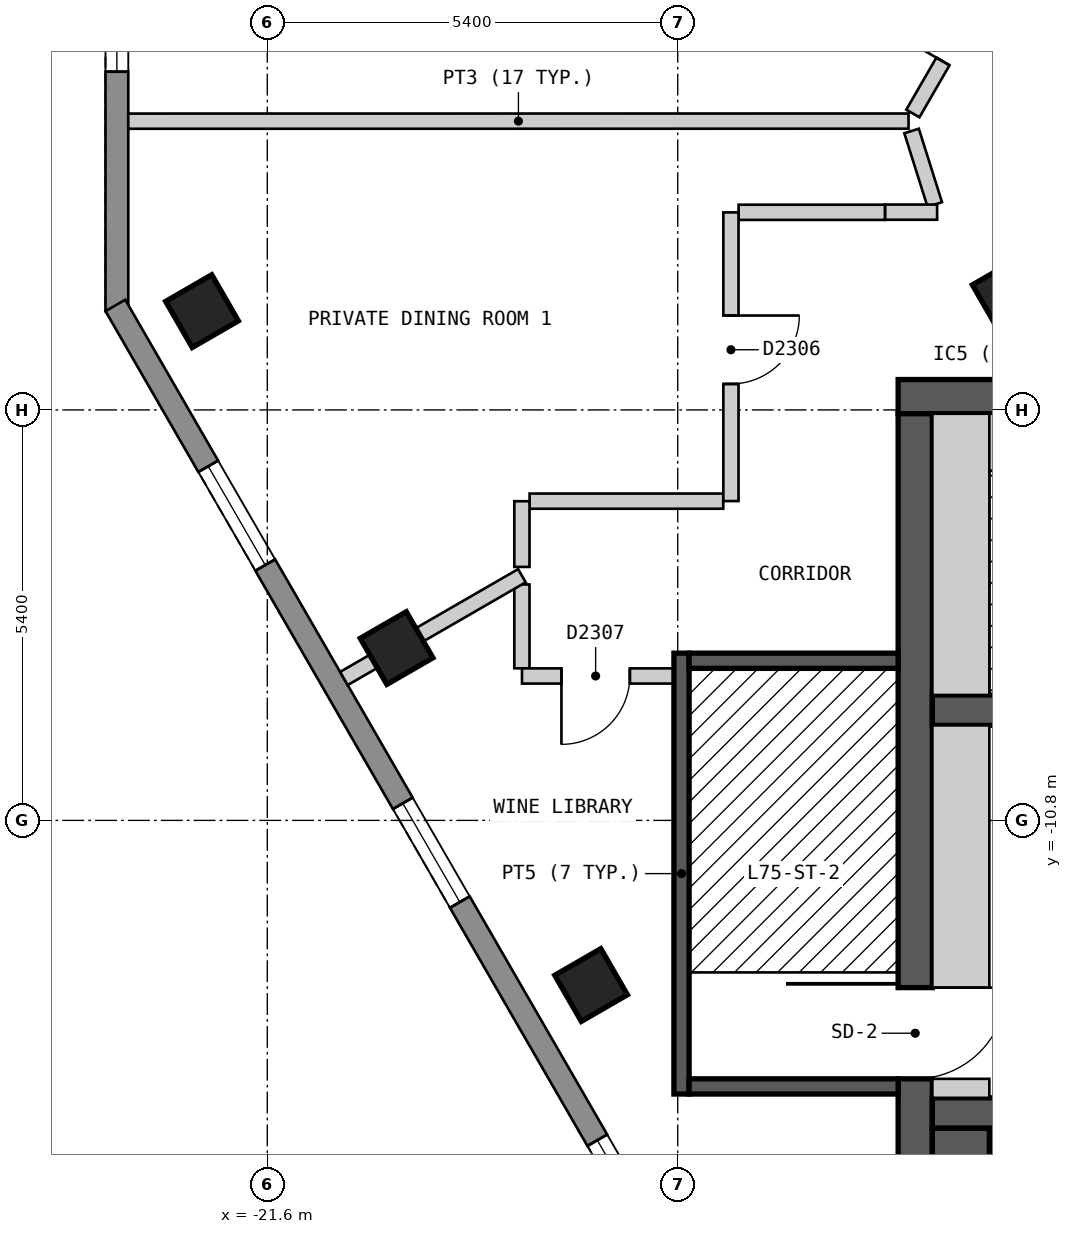
"""IFC4 building model, lengths in metres.
Left out: names, types, materials, properties, quantities, classifications, styles, units other than length and angle.
Written with IfcOpenShell. Run it as: python <this file> out.ifc"""

import sys

from ifc_helpers import new_model, si_unit, direction, frame, frame_2d, origin, origin_2d, place, context, subcontext, project, spatial, polyline, rectangle, outline, extrude, element, fill, save


model = new_model("IFC4")
c1 = context("Model", 3, precision=1e-05, world=origin(), true_north=direction((0.0, 1.0)))
c2 = subcontext(c1, "Body", "Model", "MODEL_VIEW")
j1 = project(units=[si_unit("LENGTHUNIT", "METRE"), si_unit("PLANEANGLEUNIT", "RADIAN")], contexts=[c1])
p1 = place(None, origin())
s1 = spatial("IfcSite", under=j1, at=p1, CompositionType="ELEMENT")
p2 = place(p1, origin())
s2 = spatial("IfcBuilding", under=s1, at=p2, CompositionType="ELEMENT")
p3 = place(p2, frame((0.0, 0.0, 241.8)))
s3 = spatial("IfcBuildingStorey", under=s2, at=p3, CompositionType="ELEMENT", Elevation=241.8)
for number, where, z_axis, x_axis in (
    (1, (-22.459, -4.1, 0.0), (0.0, 0.0, 1.0), (0.5, -0.866, 0.0)),
    (2, (-19.899, -8.533, 0.0), (0.0, 0.0, 1.0), (0.5, -0.866, 0.0)),
    (3, (-17.34, -12.966, 0.0), (0.0, 0.0, 1.0), (0.5, -0.866, 0.0)),
    (4, (-11.845, -3.883, 0.0), (0.0, 0.0, 1.0), (0.5, -0.866, 0.0)),
):
    element("IfcColumn", number, at=place(p3, frame(where, z_axis=z_axis, x_axis=x_axis)), inside=s3, PredefinedType="COLUMN", context=c2, shape_type="SweptSolid", body=[
        extrude(rectangle(XDim=0.7, YDim=0.7, at=origin_2d()), origin(), (0.0, 0.0, 1.0), 3.0),
    ])
p4 = place(p3, frame((-13.3, -5.225, 0.0), z_axis=(0.0, 0.0, 1.0), x_axis=(1.0, 0.0, 0.0)))
e5 = element("IfcWall", 5, at=p4, inside=s3, PredefinedType="SHEAR", context=c2, shape_type="SweptSolid", body=[
    extrude(rectangle(XDim=26.6, YDim=0.45, at=frame_2d((13.3, 0.0))), origin(), (0.0, 0.0, 1.0), 2.2),
])
p5 = place(p4, frame((23.65, 0.0, 0.0)))
e6 = element("IfcOpeningElement", 6, at=p5, cuts=e5, PredefinedType="OPENING", context=c2, shape_type="SweptSolid", body=[
    extrude(rectangle(XDim=1.2, YDim=2.1, at=frame_2d((0.6, 1.05))), frame((0.0, 0.235, 0.0), z_axis=(0.0, -1.0, 0.0), x_axis=(1.0, 0.0, 0.0)), (0.0, 0.0, 1.0), 0.47),
])
p6 = place(p3, frame((-13.075, -18.55, 0.0), z_axis=(0.0, 0.0, 1.0), x_axis=(0.0, 1.0, 0.0)))
e7 = element("IfcWall", 7, at=p6, inside=s3, PredefinedType="SHEAR", context=c2, shape_type="SweptSolid", body=[
    extrude(rectangle(XDim=13.1, YDim=0.45, at=frame_2d((6.55, 0.0))), origin(), (0.0, 0.0, 1.0), 2.2),
])
p7 = place(p6, frame((4.35, 0.0, 0.0)))
e8 = element("IfcOpeningElement", 8, at=p7, cuts=e7, PredefinedType="OPENING", context=c2, shape_type="SweptSolid", body=[
    extrude(rectangle(XDim=1.2, YDim=2.1, at=frame_2d((0.6, 1.05))), frame((0.0, 0.235, 0.0), z_axis=(0.0, -1.0, 0.0), x_axis=(1.0, 0.0, 0.0)), (0.0, 0.0, 1.0), 0.47),
])
p8 = place(p3, frame((-12.85, -14.65, 0.0), z_axis=(0.0, 0.0, 1.0), x_axis=(1.0, 0.0, 0.0)))
e9 = element("IfcWall", 9, at=p8, inside=s3, PredefinedType="SHEAR", context=c2, shape_type="SweptSolid", body=[
    extrude(rectangle(XDim=25.7, YDim=0.4, at=frame_2d((12.85, 0.0))), origin(), (0.0, 0.0, 1.0), 2.2),
])
p9 = place(p8, frame((2.05, 0.0, 0.0), z_axis=(0.0, 0.0, 1.0), x_axis=(-1.0, 0.0, 0.0)))
e10 = element("IfcOpeningElement", 10, at=p9, cuts=e9, PredefinedType="OPENING", context=c2, shape_type="SweptSolid", body=[
    extrude(rectangle(XDim=1.2, YDim=2.1, at=frame_2d((0.6, 1.05))), frame((0.0, 0.21, 0.0), z_axis=(0.0, -1.0, 0.0), x_axis=(1.0, 0.0, 0.0)), (0.0, 0.0, 1.0), 0.42),
])
p10 = place(p8, frame((24.9, 0.0, 0.0), z_axis=(0.0, 0.0, 1.0), x_axis=(-1.0, 0.0, 0.0)))
e11 = element("IfcOpeningElement", 11, at=p10, cuts=e9, PredefinedType="OPENING", context=c2, shape_type="SweptSolid", body=[
    extrude(rectangle(XDim=1.2, YDim=2.1, at=frame_2d((0.6, 1.05))), frame((0.0, 0.21, 0.0), z_axis=(0.0, -1.0, 0.0), x_axis=(1.0, 0.0, 0.0)), (0.0, 0.0, 1.0), 0.42),
])
p11 = place(p8, frame((10.0, 0.0, 0.0), z_axis=(0.0, 0.0, 1.0), x_axis=(-1.0, 0.0, 0.0)))
e12 = element("IfcOpeningElement", 12, at=p11, cuts=e9, PredefinedType="OPENING", context=c2, shape_type="SweptSolid", body=[
    extrude(rectangle(XDim=1.0, YDim=2.1, at=frame_2d((0.5, 1.05))), frame((0.0, 0.21, 0.0), z_axis=(0.0, -1.0, 0.0), x_axis=(1.0, 0.0, 0.0)), (0.0, 0.0, 1.0), 0.42),
])
p12 = place(p8, frame((16.4, 0.0, 0.0), z_axis=(0.0, 0.0, 1.0), x_axis=(-1.0, 0.0, 0.0)))
e13 = element("IfcOpeningElement", 13, at=p12, cuts=e9, PredefinedType="OPENING", context=c2, shape_type="SweptSolid", body=[
    extrude(rectangle(XDim=1.0, YDim=2.1, at=frame_2d((0.5, 1.05))), frame((0.0, 0.21, 0.0), z_axis=(0.0, -1.0, 0.0), x_axis=(1.0, 0.0, 0.0)), (0.0, 0.0, 1.0), 0.42),
])
p13 = place(p3, frame((-12.85, -9.35, 0.0), z_axis=(0.0, 0.0, 1.0), x_axis=(1.0, 0.0, 0.0)))
e14 = element("IfcWall", 14, at=p13, inside=s3, PredefinedType="SHEAR", context=c2, shape_type="SweptSolid", body=[
    extrude(rectangle(XDim=23.05, YDim=0.4, at=frame_2d((11.525, 0.0))), origin(), (0.0, 0.0, 1.0), 2.2),
])
p14 = place(p13, frame((1.45, 0.0, 0.0)))
e15 = element("IfcOpeningElement", 15, at=p14, cuts=e14, PredefinedType="OPENING", context=c2, shape_type="SweptSolid", body=[
    extrude(rectangle(XDim=1.1, YDim=2.1, at=frame_2d((0.55, 1.05))), frame((0.0, 0.21, 0.0), z_axis=(0.0, -1.0, 0.0), x_axis=(1.0, 0.0, 0.0)), (0.0, 0.0, 1.0), 0.42),
])
p15 = place(p13, frame((4.25, 0.0, 0.0)))
e16 = element("IfcOpeningElement", 16, at=p15, cuts=e14, PredefinedType="OPENING", context=c2, shape_type="SweptSolid", body=[
    extrude(rectangle(XDim=1.1, YDim=2.1, at=frame_2d((0.55, 1.05))), frame((0.0, 0.21, 0.0), z_axis=(0.0, -1.0, 0.0), x_axis=(1.0, 0.0, 0.0)), (0.0, 0.0, 1.0), 0.42),
])
p16 = place(p13, frame((7.05, 0.0, 0.0)))
e17 = element("IfcOpeningElement", 17, at=p16, cuts=e14, PredefinedType="OPENING", context=c2, shape_type="SweptSolid", body=[
    extrude(rectangle(XDim=1.1, YDim=2.1, at=frame_2d((0.55, 1.05))), frame((0.0, 0.21, 0.0), z_axis=(0.0, -1.0, 0.0), x_axis=(1.0, 0.0, 0.0)), (0.0, 0.0, 1.0), 0.42),
])
p17 = place(p13, frame((9.35, 0.0, 0.0)))
e18 = element("IfcOpeningElement", 18, at=p17, cuts=e14, PredefinedType="OPENING", context=c2, shape_type="SweptSolid", body=[
    extrude(rectangle(XDim=1.1, YDim=2.1, at=frame_2d((0.55, 1.05))), frame((0.0, 0.21, 0.0), z_axis=(0.0, -1.0, 0.0), x_axis=(1.0, 0.0, 0.0)), (0.0, 0.0, 1.0), 0.42),
])
p18 = place(p13, frame((11.65, 0.0, 0.0)))
e19 = element("IfcOpeningElement", 19, at=p18, cuts=e14, PredefinedType="OPENING", context=c2, shape_type="SweptSolid", body=[
    extrude(rectangle(XDim=1.1, YDim=2.1, at=frame_2d((0.55, 1.05))), frame((0.0, 0.21, 0.0), z_axis=(0.0, -1.0, 0.0), x_axis=(1.0, 0.0, 0.0)), (0.0, 0.0, 1.0), 0.42),
])
p19 = place(p13, frame((13.95, 0.0, 0.0)))
e20 = element("IfcOpeningElement", 20, at=p19, cuts=e14, PredefinedType="OPENING", context=c2, shape_type="SweptSolid", body=[
    extrude(rectangle(XDim=1.1, YDim=2.1, at=frame_2d((0.55, 1.05))), frame((0.0, 0.21, 0.0), z_axis=(0.0, -1.0, 0.0), x_axis=(1.0, 0.0, 0.0)), (0.0, 0.0, 1.0), 0.42),
])
p20 = place(p13, frame((16.25, 0.0, 0.0)))
e21 = element("IfcOpeningElement", 21, at=p20, cuts=e14, PredefinedType="OPENING", context=c2, shape_type="SweptSolid", body=[
    extrude(rectangle(XDim=1.1, YDim=2.1, at=frame_2d((0.55, 1.05))), frame((0.0, 0.21, 0.0), z_axis=(0.0, -1.0, 0.0), x_axis=(1.0, 0.0, 0.0)), (0.0, 0.0, 1.0), 0.42),
])
p21 = place(p13, frame((18.55, 0.0, 0.0)))
e22 = element("IfcOpeningElement", 22, at=p21, cuts=e14, PredefinedType="OPENING", context=c2, shape_type="SweptSolid", body=[
    extrude(rectangle(XDim=1.1, YDim=2.1, at=frame_2d((0.55, 1.05))), frame((0.0, 0.21, 0.0), z_axis=(0.0, -1.0, 0.0), x_axis=(1.0, 0.0, 0.0)), (0.0, 0.0, 1.0), 0.42),
])
p22 = place(p13, frame((20.95, 0.0, 0.0)))
e23 = element("IfcOpeningElement", 23, at=p22, cuts=e14, PredefinedType="OPENING", context=c2, shape_type="SweptSolid", body=[
    extrude(rectangle(XDim=1.1, YDim=2.1, at=frame_2d((0.55, 1.05))), frame((0.0, 0.21, 0.0), z_axis=(0.0, -1.0, 0.0), x_axis=(1.0, 0.0, 0.0)), (0.0, 0.0, 1.0), 0.42),
])
p23 = place(p3, frame((-23.579, 0.9, 0.0), z_axis=(0.0, 0.0, 1.0), x_axis=(0.0, -1.0, 0.0)))
e24 = element("IfcWall", 24, at=p23, inside=s3, PredefinedType="SOLIDWALL", context=c2, shape_type="SweptSolid", body=[
    extrude(outline(polyline([(0.0, -0.15), (5.0, -0.15), (4.92, 0.15), (0.08, 0.15), (0.0, -0.15)])), origin(), (0.0, 0.0, 1.0), 2.2),
])
p24 = place(p23, frame((0.65, 0.0, 0.15)))
e25 = element("IfcOpeningElement", 25, at=p24, cuts=e24, PredefinedType="OPENING", context=c2, shape_type="SweptSolid", body=[
    extrude(rectangle(XDim=1.2, YDim=2.1, at=frame_2d((0.6, 1.05))), frame((0.0, 0.16, 0.0), z_axis=(0.0, -1.0, 0.0), x_axis=(1.0, 0.0, 0.0)), (0.0, 0.0, 1.0), 0.32),
])
p25 = place(p3, frame((-23.599, -4.025, 0.0), z_axis=(0.0, 0.0, 1.0), x_axis=(0.500012653391, -0.866018098222, 0.0)))
e26 = element("IfcWall", 26, at=p25, inside=s3, PredefinedType="SOLIDWALL", context=c2, shape_type="SweptSolid", body=[
    extrude(outline(polyline([(0.0, -0.15), (16.628, -0.15), (16.548, 0.15), (0.08, 0.15), (0.0, -0.15)])), origin(), (0.0, 0.0, 1.0), 2.2),
])
p26 = place(p25, frame((2.444, 0.0, 0.15)))
e27 = element("IfcOpeningElement", 27, at=p26, cuts=e26, PredefinedType="OPENING", context=c2, shape_type="SweptSolid", body=[
    extrude(rectangle(XDim=1.5, YDim=2.1, at=frame_2d((0.75, 1.05))), frame((0.0, 0.16, 0.0), z_axis=(0.0, -1.0, 0.0), x_axis=(1.0, 0.0, 0.0)), (0.0, 0.0, 1.0), 0.32),
])
p27 = place(p25, frame((7.564, 0.0, 0.15)))
e28 = element("IfcOpeningElement", 28, at=p27, cuts=e26, PredefinedType="OPENING", context=c2, shape_type="SweptSolid", body=[
    extrude(rectangle(XDim=1.5, YDim=2.1, at=frame_2d((0.75, 1.05))), frame((0.0, 0.16, 0.0), z_axis=(0.0, -1.0, 0.0), x_axis=(1.0, 0.0, 0.0)), (0.0, 0.0, 1.0), 0.32),
])
p28 = place(p25, frame((12.682, 0.0, 0.15)))
e29 = element("IfcOpeningElement", 29, at=p28, cuts=e26, PredefinedType="OPENING", context=c2, shape_type="SweptSolid", body=[
    extrude(rectangle(XDim=1.5, YDim=2.1, at=frame_2d((0.75, 1.05))), frame((0.0, 0.16, 0.0), z_axis=(0.0, -1.0, 0.0), x_axis=(1.0, 0.0, 0.0)), (0.0, 0.0, 1.0), 0.32),
])
p29 = place(p3, frame((-13.123, -1.73, 0.0), z_axis=(0.0, 0.0, 1.0), x_axis=(0.300728027646, -0.953709941957, 0.0)))
e30 = element("IfcWall", 30, at=p29, inside=s3, PredefinedType="PARTITIONING", context=c2, shape_type="SweptSolid", body=[
    extrude(rectangle(XDim=1.014, YDim=0.2, at=frame_2d((0.507, 0.0))), origin(), (0.0, 0.0, 1.0), 2.2),
])
p30 = place(p3, frame((-18.25, -7.696, 0.0), z_axis=(0.0, 0.0, 1.0), x_axis=(0.0, -1.0, 0.0)))
e31 = element("IfcWall", 31, at=p30, inside=s3, PredefinedType="PARTITIONING", context=c2, shape_type="SweptSolid", body=[
    extrude(rectangle(XDim=1.103, YDim=0.2, at=frame_2d((0.552, 0.0))), origin(), (0.0, 0.0, 1.0), 2.2),
])
p31 = place(p3, frame((-18.149, -6.6, 0.0), z_axis=(0.0, 0.0, 1.0), x_axis=(1.0, 0.0, 0.0)))
e32 = element("IfcWall", 32, at=p31, inside=s3, PredefinedType="PARTITIONING", context=c2, shape_type="SweptSolid", body=[
    extrude(rectangle(XDim=2.548, YDim=0.2, at=frame_2d((1.274, 0.0))), origin(), (0.0, 0.0, 1.0), 2.2),
])
p32 = place(p3, frame((-18.249, -8.9, 0.0), z_axis=(0.0, 0.0, 1.0), x_axis=(1.0, 0.0, 0.0)))
e33 = element("IfcWall", 33, at=p32, inside=s3, PredefinedType="PARTITIONING", context=c2, shape_type="SweptSolid", body=[
    extrude(rectangle(XDim=2.199, YDim=0.2, at=frame_2d((1.1, 0.0))), origin(), (0.0, 0.0, 1.0), 2.2),
])
p33 = place(p32, frame((0.519, 0.0, 0.0)))
e34 = element("IfcOpeningElement", 34, at=p33, cuts=e33, PredefinedType="OPENING", context=c2, shape_type="SweptSolid", body=[
    extrude(rectangle(XDim=0.9, YDim=2.1, at=frame_2d((0.45, 1.05))), frame((0.0, 0.11, 0.0), z_axis=(0.0, -1.0, 0.0), x_axis=(1.0, 0.0, 0.0)), (0.0, 0.0, 1.0), 0.22),
])
p34 = place(p3, frame((-13.472, -2.798, 0.0), z_axis=(0.0, 0.0, 1.0), x_axis=(1.0, 0.0, 0.0)))
e35 = element("IfcWall", 35, at=p34, inside=s3, PredefinedType="PARTITIONING", context=c2, shape_type="SweptSolid", body=[
    extrude(rectangle(XDim=0.685, YDim=0.2, at=frame_2d((0.342, 0.0))), origin(), (0.0, 0.0, 1.0), 2.2),
])
p35 = place(p3, frame((-15.399, -2.8, 0.0), z_axis=(0.0, 0.0, 1.0), x_axis=(1.0, 0.0, 0.0)))
e36 = element("IfcWall", 36, at=p35, inside=s3, PredefinedType="PARTITIONING", context=c2, shape_type="SweptSolid", body=[
    extrude(rectangle(XDim=1.925, YDim=0.2, at=frame_2d((0.962, 0.0))), origin(), (0.0, 0.0, 1.0), 2.2),
])
p36 = place(p3, frame((-13.106, -1.5, 0.0), z_axis=(0.0, 0.0, 1.0), x_axis=(0.500025705601, 0.86601056214, 0.0)))
e37 = element("IfcWall", 37, at=p36, inside=s3, PredefinedType="PARTITIONING", context=c2, shape_type="SweptSolid", body=[
    extrude(rectangle(XDim=7.735, YDim=0.2, at=frame_2d((3.868, 0.0))), origin(), (0.0, 0.0, 1.0), 2.2),
])
p37 = place(p36, frame((4.79, 0.0, 0.0)))
e38 = element("IfcOpeningElement", 38, at=p37, cuts=e37, PredefinedType="OPENING", context=c2, shape_type="SweptSolid", body=[
    extrude(rectangle(XDim=0.9, YDim=2.1, at=frame_2d((0.45, 1.05))), frame((0.0, 0.11, 0.0), z_axis=(0.0, -1.0, 0.0), x_axis=(1.0, 0.0, 0.0)), (0.0, 0.0, 1.0), 0.22),
])
p38 = place(p36, frame((0.791, 0.0, 0.0)))
e39 = element("IfcOpeningElement", 39, at=p38, cuts=e37, PredefinedType="OPENING", context=c2, shape_type="SweptSolid", body=[
    extrude(rectangle(XDim=0.9, YDim=2.1, at=frame_2d((0.45, 1.05))), frame((0.0, 0.11, 0.0), z_axis=(0.0, -1.0, 0.0), x_axis=(1.0, 0.0, 0.0)), (0.0, 0.0, 1.0), 0.22),
])
p39 = place(p3, frame((-15.5, -6.599, 0.0), z_axis=(0.0, 0.0, 1.0), x_axis=(0.0, 1.0, 0.0)))
e40 = element("IfcWall", 40, at=p39, inside=s3, PredefinedType="PARTITIONING", context=c2, shape_type="SweptSolid", body=[
    extrude(rectangle(XDim=3.798, YDim=0.2, at=frame_2d((1.899, 0.0))), origin(), (0.0, 0.0, 1.0), 2.2),
])
p40 = place(p39, frame((1.541, 0.0, 0.0)))
e41 = element("IfcOpeningElement", 41, at=p40, cuts=e40, PredefinedType="OPENING", context=c2, shape_type="SweptSolid", body=[
    extrude(rectangle(XDim=0.9, YDim=2.1, at=frame_2d((0.45, 1.05))), frame((0.0, 0.11, 0.0), z_axis=(0.0, -1.0, 0.0), x_axis=(1.0, 0.0, 0.0)), (0.0, 0.0, 1.0), 0.22),
])
p41 = place(p3, frame((-18.25, -7.465, 0.0), z_axis=(0.0, 0.0, 1.0), x_axis=(0.0, 1.0, 0.0)))
e42 = element("IfcWall", 42, at=p41, inside=s3, PredefinedType="PARTITIONING", context=c2, shape_type="SweptSolid", body=[
    extrude(rectangle(XDim=0.864, YDim=0.2, at=frame_2d((0.432, 0.0))), origin(), (0.0, 0.0, 1.0), 2.2),
])
p42 = place(p3, frame((-23.429, -1.601, 0.0), z_axis=(0.0, 0.0, 1.0), x_axis=(0.999999995475, 9.5127113e-05, 0.0)))
e43 = element("IfcWall", 43, at=p42, inside=s3, PredefinedType="PARTITIONING", context=c2, shape_type="SweptSolid", body=[
    extrude(rectangle(XDim=10.266, YDim=0.2, at=frame_2d((5.133, 0.0))), origin(), (0.0, 0.0, 1.0), 2.2),
])
p43 = place(p3, frame((-20.592, -8.933, 0.0), z_axis=(0.0, 0.0, 1.0), x_axis=(0.866045775131, 0.499964714133, 0.0)))
e44 = element("IfcWall", 44, at=p43, inside=s3, PredefinedType="PARTITIONING", context=c2, shape_type="SweptSolid", body=[
    extrude(rectangle(XDim=2.704, YDim=0.2, at=frame_2d((1.352, 0.0))), origin(), (0.0, 0.0, 1.0), 2.2),
])
p44 = place(p3, frame((-16.15, -14.4, 0.0), z_axis=(0.0, 0.0, 1.0), x_axis=(0.0, 1.0, 0.0)))
e45 = element("IfcWall", 45, at=p44, inside=s3, PredefinedType="SOLIDWALL", context=c2, shape_type="SweptSolid", body=[
    extrude(rectangle(XDim=5.8, YDim=0.2, at=frame_2d((2.9, 0.0))), origin(), (0.0, 0.0, 1.0), 2.2),
])
for number, where, z_axis, x_axis in (
    (46, (-16.05, -14.3, 0.0), (0.0, 0.0, 1.0), (1.0, 0.0, 0.0)),
    (47, (-16.05, -8.7, 0.0), (0.0, 0.0, 1.0), (1.0, 0.0, 0.0)),
):
    element("IfcWall", number, at=place(p3, frame(where, z_axis=z_axis, x_axis=x_axis)), inside=s3, PredefinedType="SOLIDWALL", context=c2, shape_type="SweptSolid", body=[
        extrude(rectangle(XDim=2.75, YDim=0.2, at=frame_2d((1.375, 0.0))), origin(), (0.0, 0.0, 1.0), 2.2),
    ])
p45 = place(p3, frame((-12.475, -18.55, 0.0), z_axis=(0.0, 0.0, 1.0), x_axis=(0.0, 1.0, 0.0)))
e48 = element("IfcWall", 48, at=p45, inside=s3, PredefinedType="SOLIDWALL", context=c2, shape_type="SweptSolid", body=[
    extrude(rectangle(XDim=3.7, YDim=0.75, at=frame_2d((1.85, 0.0))), origin(), (0.0, 0.0, 1.0), 2.2),
])
p46 = place(p3, frame((-12.85, -14.325, 0.0), z_axis=(0.0, 0.0, 1.0), x_axis=(1.0, 0.0, 0.0)))
e49 = element("IfcWall", 49, at=p46, inside=s3, PredefinedType="PARTITIONING", context=c2, shape_type="SweptSolid", body=[
    extrude(rectangle(XDim=0.75, YDim=0.25, at=frame_2d((0.375, 0.0))), origin(), (0.0, 0.0, 1.0), 2.2),
])
p47 = place(p3, frame((-12.475, -13.0, 0.0), z_axis=(0.0, 0.0, 1.0), x_axis=(0.0, 1.0, 0.0)))
e50 = element("IfcWall", 50, at=p47, inside=s3, PredefinedType="PARTITIONING", context=c2, shape_type="SweptSolid", body=[
    extrude(rectangle(XDim=3.45, YDim=0.75, at=frame_2d((1.725, 0.0))), origin(), (0.0, 0.0, 1.0), 2.2),
])
p48 = place(p3, frame((-12.475, -9.15, 0.0), z_axis=(0.0, 0.0, 1.0), x_axis=(0.0, 1.0, 0.0)))
e51 = element("IfcWall", 51, at=p48, inside=s3, PredefinedType="SOLIDWALL", context=c2, shape_type="SweptSolid", body=[
    extrude(rectangle(XDim=3.7, YDim=0.75, at=frame_2d((1.85, 0.0))), origin(), (0.0, 0.0, 1.0), 2.2),
])
p49 = place(p3, frame((-12.1, -5.825, 0.0), z_axis=(0.0, 0.0, 1.0), x_axis=(1.0, 0.0, 0.0)))
e52 = element("IfcWall", 52, at=p49, inside=s3, PredefinedType="SOLIDWALL", context=c2, shape_type="SweptSolid", body=[
    extrude(rectangle(XDim=5.4, YDim=0.75, at=frame_2d((2.7, 0.0))), origin(), (0.0, 0.0, 1.0), 2.2),
])
p50 = place(p24, origin())
e53 = element("IfcWindow", 53, at=p50, inside=s3, PartitioningType="SINGLE_PANEL", PredefinedType="WINDOW", context=c2, shape_type="SweptSolid", body=[
    extrude(rectangle(XDim=1.2, YDim=2.1, at=frame_2d((0.6, 1.05))), frame((0.0, 0.03, 0.0), z_axis=(0.0, -1.0, 0.0), x_axis=(1.0, 0.0, 0.0)), (0.0, 0.0, 1.0), 0.06),
])
fill(e25, e53)
p51 = place(p26, origin())
e54 = element("IfcWindow", 54, at=p51, inside=s3, PartitioningType="SINGLE_PANEL", PredefinedType="WINDOW", context=c2, shape_type="SweptSolid", body=[
    extrude(rectangle(XDim=1.5, YDim=2.1, at=frame_2d((0.75, 1.05))), frame((0.0, 0.03, 0.0), z_axis=(0.0, -1.0, 0.0), x_axis=(1.0, 0.0, 0.0)), (0.0, 0.0, 1.0), 0.06),
])
fill(e27, e54)
p52 = place(p27, origin())
e55 = element("IfcWindow", 55, at=p52, inside=s3, PartitioningType="SINGLE_PANEL", PredefinedType="WINDOW", context=c2, shape_type="SweptSolid", body=[
    extrude(rectangle(XDim=1.5, YDim=2.1, at=frame_2d((0.75, 1.05))), frame((0.0, 0.03, 0.0), z_axis=(0.0, -1.0, 0.0), x_axis=(1.0, 0.0, 0.0)), (0.0, 0.0, 1.0), 0.06),
])
fill(e28, e55)
p53 = place(p28, origin())
e56 = element("IfcWindow", 56, at=p53, inside=s3, PartitioningType="SINGLE_PANEL", PredefinedType="WINDOW", context=c2, shape_type="SweptSolid", body=[
    extrude(rectangle(XDim=1.5, YDim=2.1, at=frame_2d((0.75, 1.05))), frame((0.0, 0.03, 0.0), z_axis=(0.0, -1.0, 0.0), x_axis=(1.0, 0.0, 0.0)), (0.0, 0.0, 1.0), 0.06),
])
fill(e29, e56)
p54 = place(p38, origin())
e57 = element("IfcDoor", 57, at=p54, inside=s3, OperationType="SINGLE_SWING_LEFT", PredefinedType="DOOR", context=c2, shape_type="SweptSolid", body=[
    extrude(rectangle(XDim=0.9, YDim=2.1, at=frame_2d((0.45, 1.05))), frame((0.0, 0.025, 0.0), z_axis=(0.0, -1.0, 0.0), x_axis=(1.0, 0.0, 0.0)), (0.0, 0.0, 1.0), 0.05),
])
fill(e39, e57)
p55 = place(p40, origin())
e58 = element("IfcDoor", 58, at=p55, inside=s3, OperationType="SINGLE_SWING_RIGHT", PredefinedType="DOOR", context=c2, shape_type="SweptSolid", body=[
    extrude(rectangle(XDim=0.9, YDim=2.1, at=frame_2d((0.45, 1.05))), frame((0.0, 0.025, 0.0), z_axis=(0.0, -1.0, 0.0), x_axis=(1.0, 0.0, 0.0)), (0.0, 0.0, 1.0), 0.05),
])
fill(e41, e58)
p56 = place(p33, origin())
e59 = element("IfcDoor", 59, at=p56, inside=s3, OperationType="SINGLE_SWING_LEFT", PredefinedType="DOOR", context=c2, shape_type="SweptSolid", body=[
    extrude(rectangle(XDim=0.9, YDim=2.1, at=frame_2d((0.45, 1.05))), frame((0.0, 0.025, 0.0), z_axis=(0.0, -1.0, 0.0), x_axis=(1.0, 0.0, 0.0)), (0.0, 0.0, 1.0), 0.05),
])
fill(e34, e59)
p57 = place(p7, origin())
e60 = element("IfcDoor", 60, at=p57, inside=s3, OperationType="SINGLE_SWING_RIGHT", PredefinedType="DOOR", context=c2, shape_type="SweptSolid", body=[
    extrude(rectangle(XDim=1.2, YDim=2.1, at=frame_2d((0.6, 1.05))), frame((0.0, 0.025, 0.0), z_axis=(0.0, -1.0, 0.0), x_axis=(1.0, 0.0, 0.0)), (0.0, 0.0, 1.0), 0.05),
])
fill(e8, e60)
save(model, sys.argv[1])
